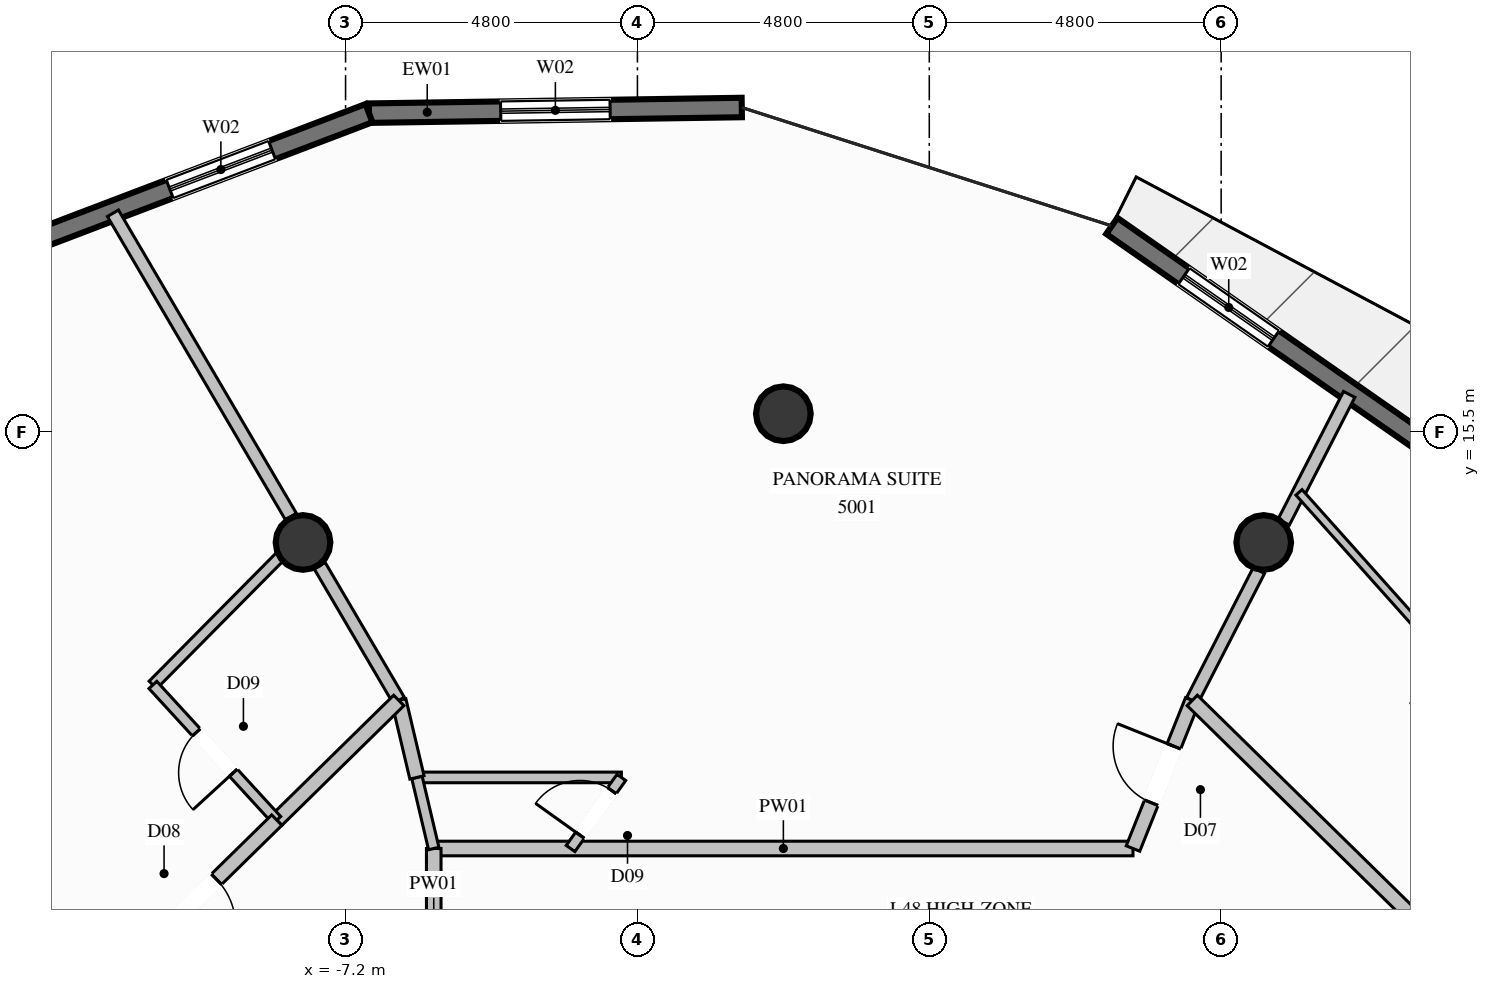
"""IFC4 building model, lengths in metres.
Left out: names, types, materials, properties, quantities, classifications, styles, units other than length and angle.
Written with IfcOpenShell. Run it as: python <this file> out.ifc"""

import sys

from ifc_helpers import new_model, si_unit, direction, frame, frame_2d, origin, origin_2d, place, context, subcontext, project, spatial, rectangle, circle, extrude, element, fill, save


model = new_model("IFC4")
c1 = context("Model", 3, precision=1e-05, world=origin(), true_north=direction((0.0, 1.0)))
c2 = subcontext(c1, "Body", "Model", "MODEL_VIEW")
j1 = project(units=[si_unit("LENGTHUNIT", "METRE"), si_unit("PLANEANGLEUNIT", "RADIAN")], contexts=[c1])
p1 = place(None, origin())
s1 = spatial("IfcSite", under=j1, at=p1, CompositionType="ELEMENT")
p2 = place(p1, origin())
s2 = spatial("IfcBuilding", under=s1, at=p2, CompositionType="ELEMENT")
p3 = place(p2, frame((0.0, 0.0, 187.6)))
s3 = spatial("IfcBuildingStorey", under=s2, at=p3, CompositionType="ELEMENT", Elevation=187.6)
for number, where, z_axis, x_axis in (
    (1, (7.9, 13.683, 0.0), (0.0, 0.0, 1.0), (1.0, 0.0, 0.0)),
    (2, (0.0, 15.8, 0.0), (0.0, 0.0, 1.0), (1.0, 0.0, 0.0)),
    (3, (-7.9, 13.683, 0.0), (0.0, 0.0, 1.0), (1.0, 0.0, 0.0)),
):
    element("IfcColumn", number, at=place(p3, frame(where, z_axis=z_axis, x_axis=x_axis)), inside=s3, PredefinedType="COLUMN", context=c2, shape_type="SweptSolid", body=[
        extrude(circle(Radius=0.45, at=origin_2d()), origin(), (0.0, 0.0, 1.0), 3.6),
    ])
p4 = place(p3, frame((5.402, 18.889, 0.0), z_axis=(0.0, 0.0, 1.0), x_axis=(0.820277874486, -0.571965216275, 0.0)))
e4 = element("IfcWall", 4, at=p4, inside=s3, PredefinedType="SOLIDWALL", context=c2, shape_type="SweptSolid", body=[
    extrude(rectangle(XDim=6.636, YDim=0.32, at=frame_2d((3.318, 0.0))), origin(), (0.0, 0.0, 1.0), 3.36),
])
p5 = place(p4, frame((1.444, 0.0, 0.35)))
e5 = element("IfcOpeningElement", 5, at=p5, cuts=e4, PredefinedType="OPENING", context=c2, shape_type="SweptSolid", body=[
    extrude(rectangle(XDim=1.8, YDim=2.6, at=frame_2d((0.9, 1.3))), frame((0.0, 0.17, 0.0), z_axis=(0.0, -1.0, 0.0), x_axis=(1.0, 0.0, 0.0)), (0.0, 0.0, 1.0), 0.34),
])
p6 = place(p3, frame((-6.815, 20.743, 0.0), z_axis=(0.0, 0.0, 1.0), x_axis=(0.99988492463, 0.015170283382, 0.0)))
e6 = element("IfcWall", 6, at=p6, inside=s3, PredefinedType="SOLIDWALL", context=c2, shape_type="SweptSolid", body=[
    extrude(rectangle(XDim=6.132, YDim=0.32, at=frame_2d((3.066, 0.0))), origin(), (0.0, 0.0, 1.0), 3.36),
])
p7 = place(p6, frame((2.166, 0.0, 0.35)))
e7 = element("IfcOpeningElement", 7, at=p7, cuts=e6, PredefinedType="OPENING", context=c2, shape_type="SweptSolid", body=[
    extrude(rectangle(XDim=1.8, YDim=2.6, at=frame_2d((0.9, 1.3))), frame((0.0, 0.17, 0.0), z_axis=(0.0, -1.0, 0.0), x_axis=(1.0, 0.0, 0.0)), (0.0, 0.0, 1.0), 0.34),
])
p8 = place(p3, frame((-12.391, 18.62, 0.0), z_axis=(0.0, 0.0, 1.0), x_axis=(0.934568736607, 0.355782625429, 0.0)))
e8 = element("IfcWall", 8, at=p8, inside=s3, PredefinedType="SOLIDWALL", context=c2, shape_type="SweptSolid", body=[
    extrude(rectangle(XDim=5.967, YDim=0.32, at=frame_2d((2.983, 0.0))), origin(), (0.0, 0.0, 1.0), 3.36),
])
p9 = place(p8, frame((2.46, 0.0, 0.35)))
e9 = element("IfcOpeningElement", 9, at=p9, cuts=e8, PredefinedType="OPENING", context=c2, shape_type="SweptSolid", body=[
    extrude(rectangle(XDim=1.8, YDim=2.6, at=frame_2d((0.9, 1.3))), frame((0.0, 0.17, 0.0), z_axis=(0.0, -1.0, 0.0), x_axis=(1.0, 0.0, 0.0)), (0.0, 0.0, 1.0), 0.34),
])
p10 = place(p3, frame((-5.75, 8.65, 0.0), z_axis=(0.0, 0.0, 1.0), x_axis=(1.0, 0.0, 0.0)))
e10 = element("IfcWall", 10, at=p10, inside=s3, PredefinedType="PARTITIONING", context=c2, shape_type="SweptSolid", body=[
    extrude(rectangle(XDim=11.5, YDim=0.24, at=frame_2d((5.75, 0.0))), origin(), (0.0, 0.0, 1.0), 3.36),
])
p11 = place(p3, frame((-5.75, 6.1, 0.0), z_axis=(0.0, 0.0, 1.0), x_axis=(0.0, 1.0, 0.0)))
e11 = element("IfcWall", 11, at=p11, inside=s3, PredefinedType="PARTITIONING", context=c2, shape_type="SweptSolid", body=[
    extrude(rectangle(XDim=2.55, YDim=0.24, at=frame_2d((1.275, 0.0))), origin(), (0.0, 0.0, 1.0), 3.36),
])
p12 = place(p3, frame((6.725, 11.085, 0.0), z_axis=(0.0, 0.0, 1.0), x_axis=(0.456347633058, 0.889801572151, 0.0)))
e12 = element("IfcWall", 12, at=p12, inside=s3, PredefinedType="PARTITIONING", context=c2, shape_type="SweptSolid", body=[
    extrude(rectangle(XDim=2.399, YDim=0.21, at=frame_2d((1.2, 0.0))), origin(), (0.0, 0.0, 1.0), 2.801),
])
p13 = place(p3, frame((8.229, 14.018, 0.0), z_axis=(0.0, 0.0, 1.0), x_axis=(0.456335550331, 0.889807768849, 0.0)))
e13 = element("IfcWall", 13, at=p13, inside=s3, PredefinedType="PARTITIONING", context=c2, shape_type="SweptSolid", body=[
    extrude(rectangle(XDim=2.36, YDim=0.21, at=frame_2d((1.18, 0.0))), origin(), (0.0, 0.0, 1.0), 3.36),
])
p14 = place(p3, frame((-6.325, 11.085, 0.0), z_axis=(0.0, 0.0, 1.0), x_axis=(-0.506285052897, 0.862366189744, 0.0)))
e14 = element("IfcWall", 14, at=p14, inside=s3, PredefinedType="PARTITIONING", context=c2, shape_type="SweptSolid", body=[
    extrude(rectangle(XDim=2.57, YDim=0.21, at=frame_2d((1.285, 0.0))), origin(), (0.0, 0.0, 1.0), 2.801),
])
p15 = place(p3, frame((-8.099, 14.109, 0.0), z_axis=(0.0, 0.0, 1.0), x_axis=(-0.506071559284, 0.862491493804, 0.0)))
e15 = element("IfcWall", 15, at=p15, inside=s3, PredefinedType="PARTITIONING", context=c2, shape_type="SweptSolid", body=[
    extrude(rectangle(XDim=5.783, YDim=0.21, at=frame_2d((2.892, 0.0))), origin(), (0.0, 0.0, 1.0), 3.36),
])
p16 = place(p3, frame((-6.026, 9.819, 0.0), z_axis=(0.0, 0.0, 1.0), x_axis=(1.0, 0.0, 0.0)))
e16 = element("IfcWall", 16, at=p16, inside=s3, PredefinedType="PLUMBINGWALL", context=c2, shape_type="SweptSolid", body=[
    extrude(rectangle(XDim=3.362, YDim=0.175, at=frame_2d((1.681, 0.0))), origin(), (0.0, 0.0, 1.0), 3.36),
])
p17 = place(p3, frame((-6.026, 9.819, 0.0), z_axis=(0.0, 0.0, 1.0), x_axis=(0.229650980365, -0.973273048644, 0.0)))
e17 = element("IfcWall", 17, at=p17, inside=s3, PredefinedType="PLUMBINGWALL", context=c2, shape_type="SweptSolid", body=[
    extrude(rectangle(XDim=1.201, YDim=0.175, at=frame_2d((0.601, 0.0))), origin(), (0.0, 0.0, 1.0), 3.36),
])
p18 = place(p3, frame((-3.5, 8.65, 0.0), z_axis=(0.0, 0.0, 1.0), x_axis=(0.581607698531, 0.813469412461, 0.0)))
e18 = element("IfcWall", 18, at=p18, inside=s3, PredefinedType="PLUMBINGWALL", context=c2, shape_type="SweptSolid", body=[
    extrude(rectangle(XDim=1.437, YDim=0.175, at=frame_2d((0.719, 0.0))), origin(), (0.0, 0.0, 1.0), 3.36),
])
p19 = place(p18, frame((0.269, 0.0, 0.0)))
e19 = element("IfcOpeningElement", 19, at=p19, cuts=e18, PredefinedType="OPENING", context=c2, shape_type="SweptSolid", body=[
    extrude(rectangle(XDim=0.9, YDim=2.1, at=frame_2d((0.45, 1.05))), frame((0.0, 0.098, 0.0), z_axis=(0.0, -1.0, 0.0), x_axis=(1.0, 0.0, 0.0)), (0.0, 0.0, 1.0), 0.195),
])
p20 = place(p3, frame((-6.026, 9.819, 0.0), z_axis=(0.0, 0.0, 1.0), x_axis=(-0.229928489857, 0.973207526457, 0.0)))
e20 = element("IfcWall", 20, at=p20, inside=s3, PredefinedType="PARTITIONING", context=c2, shape_type="SweptSolid", body=[
    extrude(rectangle(XDim=1.301, YDim=0.24, at=frame_2d((0.65, 0.0))), origin(), (0.0, 0.0, 1.0), 3.36),
])
p21 = place(p3, frame((5.75, 8.65, 0.0), z_axis=(0.0, 0.0, 1.0), x_axis=(0.371743694646, 0.928335405708, 0.0)))
e21 = element("IfcWall", 21, at=p21, inside=s3, PredefinedType="PARTITIONING", context=c2, shape_type="SweptSolid", body=[
    extrude(rectangle(XDim=2.623, YDim=0.24, at=frame_2d((1.312, 0.0))), origin(), (0.0, 0.0, 1.0), 3.36),
])
p22 = place(p21, frame((0.811, 0.0, 0.0)))
e22 = element("IfcOpeningElement", 22, at=p22, cuts=e21, PredefinedType="OPENING", context=c2, shape_type="SweptSolid", body=[
    extrude(rectangle(XDim=1.0, YDim=2.2, at=frame_2d((0.5, 1.1))), frame((0.0, 0.13, 0.0), z_axis=(0.0, -1.0, 0.0), x_axis=(1.0, 0.0, 0.0)), (0.0, 0.0, 1.0), 0.26),
])
p23 = place(p3, frame((-6.325, 11.085, 0.0), z_axis=(0.0, 0.0, 1.0), x_axis=(-0.713850549357, -0.700298074524, 0.0)))
e23 = element("IfcWall", 23, at=p23, inside=s3, PredefinedType="PARTITIONING", context=c2, shape_type="SweptSolid", body=[
    extrude(rectangle(XDim=2.81, YDim=0.24, at=frame_2d((1.405, 0.0))), origin(), (0.0, 0.0, 1.0), 3.36),
])
p24 = place(p3, frame((-7.923, 13.809, 0.0), z_axis=(0.0, 0.0, 1.0), x_axis=(-0.703762044394, -0.710435771108, 0.0)))
e24 = element("IfcWall", 24, at=p24, inside=s3, PredefinedType="PLUMBINGWALL", context=c2, shape_type="SweptSolid", body=[
    extrude(rectangle(XDim=3.475, YDim=0.175, at=frame_2d((1.738, 0.0))), origin(), (0.0, 0.0, 1.0), 2.929),
])
p25 = place(p3, frame((-8.331, 9.117, 0.0), z_axis=(0.0, 0.0, 1.0), x_axis=(-0.675717296863, 0.737160860817, 0.0)))
e25 = element("IfcWall", 25, at=p25, inside=s3, PredefinedType="PLUMBINGWALL", context=c2, shape_type="SweptSolid", body=[
    extrude(rectangle(XDim=3.016, YDim=0.175, at=frame_2d((1.508, 0.0))), origin(), (0.0, 0.0, 1.0), 3.36),
])
p26 = place(p25, frame((1.058, 0.0, 0.0)))
e26 = element("IfcOpeningElement", 26, at=p26, cuts=e25, PredefinedType="OPENING", context=c2, shape_type="SweptSolid", body=[
    extrude(rectangle(XDim=0.9, YDim=2.1, at=frame_2d((0.45, 1.05))), frame((0.0, 0.098, 0.0), z_axis=(0.0, -1.0, 0.0), x_axis=(1.0, 0.0, 0.0)), (0.0, 0.0, 1.0), 0.195),
])
p27 = place(p3, frame((-8.331, 9.117, 0.0), z_axis=(0.0, 0.0, 1.0), x_axis=(-0.714024122855, -0.700121098084, 0.0)))
e27 = element("IfcWall", 27, at=p27, inside=s3, PredefinedType="PARTITIONING", context=c2, shape_type="SweptSolid", body=[
    extrude(rectangle(XDim=3.881, YDim=0.24, at=frame_2d((1.94, 0.0))), origin(), (0.0, 0.0, 1.0), 3.36),
])
p28 = place(p27, frame((1.39, 0.0, 0.0)))
e28 = element("IfcOpeningElement", 28, at=p28, cuts=e27, PredefinedType="OPENING", context=c2, shape_type="SweptSolid", body=[
    extrude(rectangle(XDim=1.1, YDim=2.3, at=frame_2d((0.55, 1.15))), frame((0.0, 0.13, 0.0), z_axis=(0.0, -1.0, 0.0), x_axis=(1.0, 0.0, 0.0)), (0.0, 0.0, 1.0), 0.26),
])
p29 = place(p3, frame((11.502, 6.4, 0.0), z_axis=(0.0, 0.0, 1.0), x_axis=(-0.713933337596, 0.700213674152, 0.0)))
e29 = element("IfcWall", 29, at=p29, inside=s3, PredefinedType="PARTITIONING", context=c2, shape_type="SweptSolid", body=[
    extrude(rectangle(XDim=6.691, YDim=0.24, at=frame_2d((3.345, 0.0))), origin(), (0.0, 0.0, 1.0), 3.36),
])
p30 = place(p3, frame((14.191, 8.116, 0.0), z_axis=(0.0, 0.0, 1.0), x_axis=(-0.666313460935, 0.745671758736, 0.0)))
e30 = element("IfcWall", 30, at=p30, inside=s3, PredefinedType="PARTITIONING", context=c2, shape_type="SweptSolid", body=[
    extrude(rectangle(XDim=8.571, YDim=0.135, at=frame_2d((4.286, 0.0))), origin(), (0.0, 0.0, 1.0), 2.929),
])
p31 = place(p30, frame((3.81, 0.0, 0.0)))
e31 = element("IfcOpeningElement", 31, at=p31, cuts=e30, PredefinedType="OPENING", context=c2, shape_type="SweptSolid", body=[
    extrude(rectangle(XDim=0.95, YDim=2.1, at=frame_2d((0.475, 1.05))), frame((0.0, 0.078, 0.0), z_axis=(0.0, -1.0, 0.0), x_axis=(1.0, 0.0, 0.0)), (0.0, 0.0, 1.0), 0.155),
])
p32 = place(p5, origin())
e32 = element("IfcWindow", 32, at=p32, inside=s3, PartitioningType="SINGLE_PANEL", PredefinedType="WINDOW", context=c2, shape_type="SweptSolid", body=[
    extrude(rectangle(XDim=1.8, YDim=2.6, at=frame_2d((0.9, 1.3))), frame((0.0, 0.03, 0.0), z_axis=(0.0, -1.0, 0.0), x_axis=(1.0, 0.0, 0.0)), (0.0, 0.0, 1.0), 0.06),
])
fill(e5, e32)
p33 = place(p7, origin())
e33 = element("IfcWindow", 33, at=p33, inside=s3, PartitioningType="SINGLE_PANEL", PredefinedType="WINDOW", context=c2, shape_type="SweptSolid", body=[
    extrude(rectangle(XDim=1.8, YDim=2.6, at=frame_2d((0.9, 1.3))), frame((0.0, 0.03, 0.0), z_axis=(0.0, -1.0, 0.0), x_axis=(1.0, 0.0, 0.0)), (0.0, 0.0, 1.0), 0.06),
])
fill(e7, e33)
p34 = place(p9, origin())
e34 = element("IfcWindow", 34, at=p34, inside=s3, PartitioningType="SINGLE_PANEL", PredefinedType="WINDOW", context=c2, shape_type="SweptSolid", body=[
    extrude(rectangle(XDim=1.8, YDim=2.6, at=frame_2d((0.9, 1.3))), frame((0.0, 0.03, 0.0), z_axis=(0.0, -1.0, 0.0), x_axis=(1.0, 0.0, 0.0)), (0.0, 0.0, 1.0), 0.06),
])
fill(e9, e34)
p35 = place(p19, origin())
e35 = element("IfcDoor", 35, at=p35, inside=s3, OperationType="SINGLE_SWING_LEFT", PredefinedType="DOOR", context=c2, shape_type="SweptSolid", body=[
    extrude(rectangle(XDim=0.9, YDim=2.1, at=frame_2d((0.45, 1.05))), frame((0.0, 0.025, 0.0), z_axis=(0.0, -1.0, 0.0), x_axis=(1.0, 0.0, 0.0)), (0.0, 0.0, 1.0), 0.05),
])
fill(e19, e35)
p36 = place(p22, origin())
e36 = element("IfcDoor", 36, at=p36, inside=s3, OperationType="SINGLE_SWING_RIGHT", PredefinedType="DOOR", context=c2, shape_type="SweptSolid", body=[
    extrude(rectangle(XDim=1.0, YDim=2.2, at=frame_2d((0.5, 1.1))), frame((0.0, 0.025, 0.0), z_axis=(0.0, -1.0, 0.0), x_axis=(1.0, 0.0, 0.0)), (0.0, 0.0, 1.0), 0.05),
])
fill(e22, e36)
p37 = place(p26, origin())
e37 = element("IfcDoor", 37, at=p37, inside=s3, OperationType="SINGLE_SWING_LEFT", PredefinedType="DOOR", context=c2, shape_type="SweptSolid", body=[
    extrude(rectangle(XDim=0.9, YDim=2.1, at=frame_2d((0.45, 1.05))), frame((0.0, 0.025, 0.0), z_axis=(0.0, -1.0, 0.0), x_axis=(1.0, 0.0, 0.0)), (0.0, 0.0, 1.0), 0.05),
])
fill(e26, e37)
p38 = place(p28, origin())
e38 = element("IfcDoor", 38, at=p38, inside=s3, OperationType="SINGLE_SWING_RIGHT", PredefinedType="DOOR", context=c2, shape_type="SweptSolid", body=[
    extrude(rectangle(XDim=1.1, YDim=2.3, at=frame_2d((0.55, 1.15))), frame((0.0, 0.025, 0.0), z_axis=(0.0, -1.0, 0.0), x_axis=(1.0, 0.0, 0.0)), (0.0, 0.0, 1.0), 0.05),
])
fill(e28, e38)
save(model, sys.argv[1])
